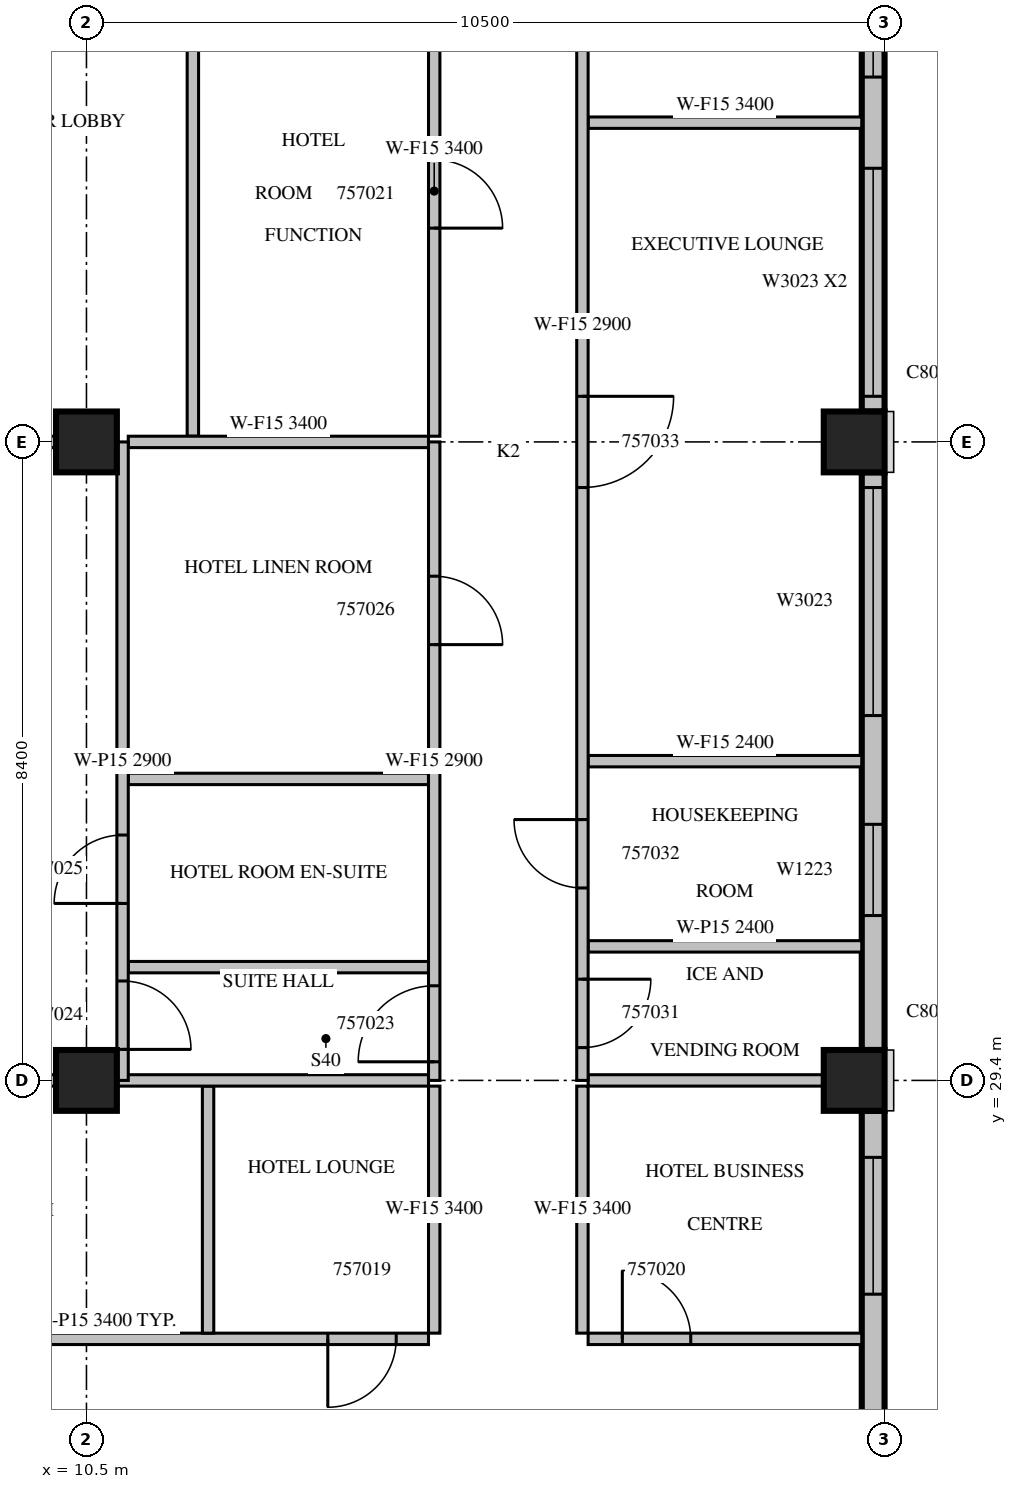
"""IFC4 building model, lengths in metres.
Left out: names, types, materials, properties, quantities, classifications, styles, units other than length and angle.
Written with IfcOpenShell. Run it as: python <this file> out.ifc"""

import sys

from ifc_helpers import new_model, si_unit, direction, frame, frame_2d, origin, origin_2d, place, context, subcontext, project, spatial, rectangle, extrude, source, transform, mapped, element, fill, save


model = new_model("IFC4")
c1 = context("Model", 3, precision=1e-05, world=origin(), true_north=direction((0.0, 1.0)))
c2 = subcontext(c1, "Body", "Model", "MODEL_VIEW")
j1 = project(units=[si_unit("LENGTHUNIT", "METRE"), si_unit("PLANEANGLEUNIT", "RADIAN")], contexts=[c1])
p1 = place(None, origin())
s1 = spatial("IfcSite", under=j1, at=p1, CompositionType="ELEMENT")
p2 = place(p1, origin())
s2 = spatial("IfcBuilding", under=s1, at=p2, CompositionType="ELEMENT")
p3 = place(p2, frame((0.0, 0.0, 250.0)))
s3 = spatial("IfcBuildingStorey", under=s2, at=p3, CompositionType="ELEMENT", Elevation=250.0)
m1 = source(origin(), c2, "Body", "SweptSolid", [
    extrude(rectangle(XDim=0.8, YDim=0.8, at=origin_2d()), origin(), (0.0, 0.0, 1.0), 3.8),
])
for number, where, z_axis, x_axis in (
    (1, (10.5, 29.4, 0.0), (0.0, 0.0, 1.0), (1.0, 0.0, 0.0)),
    (2, (20.6, 29.4, 0.0), (0.0, 0.0, 1.0), (1.0, 0.0, 0.0)),
    (3, (10.5, 37.8, 0.0), (0.0, 0.0, 1.0), (1.0, 0.0, 0.0)),
    (4, (20.6, 37.8, 0.0), (0.0, 0.0, 1.0), (1.0, 0.0, 0.0)),
):
    element("IfcColumn", number, at=place(p3, frame(where, z_axis=z_axis, x_axis=x_axis)), inside=s3, PredefinedType="COLUMN", context=c2, shape_type="MappedRepresentation", body=[
        mapped(m1, transform((0.0, 0.0, 0.0), scale=1.0)),
    ])
m2 = source(origin(), c2, "Body", "SweptSolid", [
    extrude(rectangle(XDim=7.2, YDim=0.3, at=frame_2d((3.6, 0.0))), origin(), (0.0, 0.0, 1.0), 3.4),
])
p4 = place(p3, frame((20.85, 21.8, 0.0), z_axis=(0.0, 0.0, 1.0), x_axis=(0.0, 1.0, 0.0)))
e5 = element("IfcWall", 5, at=p4, inside=s3, PredefinedType="STANDARD", context=c2, shape_type="MappedRepresentation", body=[
    mapped(m2, transform((0.0, 0.0, 0.0), scale=1.0)),
])
m3 = source(origin(), c2, "Body", "SweptSolid", [
    extrude(rectangle(XDim=1.8, YDim=2.3, at=frame_2d((0.9, 1.15))), frame((0.0, 0.16, 0.0), z_axis=(0.0, -1.0, 0.0), x_axis=(1.0, 0.0, 0.0)), (0.0, 0.0, 1.0), 0.32),
])
p5 = place(p4, frame((0.4, 0.0, 0.6)))
e6 = element("IfcOpeningElement", 6, at=p5, cuts=e5, PredefinedType="OPENING", context=c2, shape_type="MappedRepresentation", body=[
    mapped(m3, transform((0.0, 0.0, 0.0), scale=1.0)),
])
p6 = place(p4, frame((4.787, 0.0, 0.6)))
e7 = element("IfcOpeningElement", 7, at=p6, cuts=e5, PredefinedType="OPENING", context=c2, shape_type="MappedRepresentation", body=[
    mapped(m3, transform((0.0, 0.0, 0.0), scale=1.0)),
])
m4 = source(origin(), c2, "Body", "SweptSolid", [
    extrude(rectangle(XDim=7.6, YDim=0.3, at=frame_2d((3.8, 0.0))), origin(), (0.0, 0.0, 1.0), 3.4),
])
p7 = place(p3, frame((20.85, 29.8, 0.0), z_axis=(0.0, 0.0, 1.0), x_axis=(0.0, 1.0, 0.0)))
e8 = element("IfcWall", 8, at=p7, inside=s3, PredefinedType="STANDARD", context=c2, shape_type="MappedRepresentation", body=[
    mapped(m4, transform((0.0, 0.0, 0.0), scale=1.0)),
])
m5 = source(origin(), c2, "Body", "SweptSolid", [
    extrude(rectangle(XDim=1.2, YDim=2.3, at=frame_2d((0.6, 1.15))), frame((0.0, 0.16, 0.0), z_axis=(0.0, -1.0, 0.0), x_axis=(1.0, 0.0, 0.0)), (0.0, 0.0, 1.0), 0.32),
])
p8 = place(p7, frame((1.769, 0.0, 0.6)))
e9 = element("IfcOpeningElement", 9, at=p8, cuts=e8, PredefinedType="OPENING", context=c2, shape_type="MappedRepresentation", body=[
    mapped(m5, transform((0.0, 0.0, 0.0), scale=1.0)),
])
m6 = source(origin(), c2, "Body", "SweptSolid", [
    extrude(rectangle(XDim=3.0, YDim=2.3, at=frame_2d((1.5, 1.15))), frame((0.0, 0.16, 0.0), z_axis=(0.0, -1.0, 0.0), x_axis=(1.0, 0.0, 0.0)), (0.0, 0.0, 1.0), 0.32),
])
p9 = place(p7, frame((4.4, 0.0, 0.6)))
e10 = element("IfcOpeningElement", 10, at=p9, cuts=e8, PredefinedType="OPENING", context=c2, shape_type="MappedRepresentation", body=[
    mapped(m6, transform((0.0, 0.0, 0.0), scale=1.0)),
])
p10 = place(p3, frame((20.85, 38.2, 0.0), z_axis=(0.0, 0.0, 1.0), x_axis=(0.0, 1.0, 0.0)))
e11 = element("IfcWall", 11, at=p10, inside=s3, PredefinedType="STANDARD", context=c2, shape_type="MappedRepresentation", body=[
    mapped(m4, transform((0.0, 0.0, 0.0), scale=1.0)),
])
p11 = place(p10, frame((0.2, 0.0, 0.6)))
e12 = element("IfcOpeningElement", 12, at=p11, cuts=e11, PredefinedType="OPENING", context=c2, shape_type="MappedRepresentation", body=[
    mapped(m6, transform((0.0, 0.0, 0.0), scale=1.0)),
])
p12 = place(p10, frame((4.4, 0.0, 0.6)))
e13 = element("IfcOpeningElement", 13, at=p12, cuts=e11, PredefinedType="OPENING", context=c2, shape_type="MappedRepresentation", body=[
    mapped(m6, transform((0.0, 0.0, 0.0), scale=1.0)),
])
m7 = source(origin(), c2, "Body", "SweptSolid", [
    extrude(rectangle(XDim=8.495, YDim=0.15, at=frame_2d((4.247, 0.0))), origin(), (0.0, 0.0, 1.0), 3.4),
])
p13 = place(p3, frame((6.505, 26.0, 0.0), z_axis=(0.0, 0.0, 1.0), x_axis=(1.0, 0.0, 0.0)))
e14 = element("IfcWall", 14, at=p13, inside=s3, PredefinedType="PARTITIONING", context=c2, shape_type="MappedRepresentation", body=[
    mapped(m7, transform((0.0, 0.0, 0.0), scale=1.0)),
])
m8 = source(origin(), c2, "Body", "SweptSolid", [
    extrude(rectangle(XDim=0.9, YDim=2.1, at=frame_2d((0.45, 1.05))), frame((0.0, 0.085, 0.0), z_axis=(0.0, -1.0, 0.0), x_axis=(1.0, 0.0, 0.0)), (0.0, 0.0, 1.0), 0.17),
])
p14 = place(p13, frame((2.095, 0.0, 0.0)))
e15 = element("IfcOpeningElement", 15, at=p14, cuts=e14, PredefinedType="OPENING", context=c2, shape_type="MappedRepresentation", body=[
    mapped(m8, transform((0.0, 0.0, 0.0), scale=1.0)),
])
p15 = place(p13, frame((7.17, 0.0, 0.0)))
e16 = element("IfcOpeningElement", 16, at=p15, cuts=e14, PredefinedType="OPENING", context=c2, shape_type="MappedRepresentation", body=[
    mapped(m8, transform((0.0, 0.0, 0.0), scale=1.0)),
])
m9 = source(origin(), c2, "Body", "SweptSolid", [
    extrude(rectangle(XDim=3.6, YDim=0.15, at=frame_2d((1.8, 0.0))), origin(), (0.0, 0.0, 1.0), 3.4),
])
p16 = place(p3, frame((17.1, 26.0, 0.0), z_axis=(0.0, 0.0, 1.0), x_axis=(1.0, 0.0, 0.0)))
e17 = element("IfcWall", 17, at=p16, inside=s3, PredefinedType="PARTITIONING", context=c2, shape_type="MappedRepresentation", body=[
    mapped(m9, transform((0.0, 0.0, 0.0), scale=1.0)),
])
p17 = place(p16, frame((0.45, 0.0, 0.0)))
e18 = element("IfcOpeningElement", 18, at=p17, cuts=e17, PredefinedType="OPENING", context=c2, shape_type="MappedRepresentation", body=[
    mapped(m8, transform((0.0, 0.0, 0.0), scale=1.0)),
])
m10 = source(origin(), c2, "Body", "SweptSolid", [
    extrude(rectangle(XDim=3.25, YDim=0.15, at=frame_2d((1.625, 0.0))), origin(), (0.0, 0.0, 1.0), 3.4),
])
for number, where, z_axis, x_axis in (
    (19, (12.1, 26.075, 0.0), (0.0, 0.0, 1.0), (0.0, 1.0, 0.0)),
    (20, (15.075, 26.075, 0.0), (0.0, 0.0, 1.0), (0.0, 1.0, 0.0)),
    (21, (17.025, 29.325, 0.0), (0.0, 0.0, 1.0), (0.0, -1.0, 0.0)),
):
    element("IfcWall", number, at=place(p3, frame(where, z_axis=z_axis, x_axis=x_axis)), inside=s3, PredefinedType="PARTITIONING", context=c2, shape_type="MappedRepresentation", body=[
        mapped(m10, transform((0.0, 0.0, 0.0), scale=1.0)),
    ])
m11 = source(origin(), c2, "Body", "SweptSolid", [
    extrude(rectangle(XDim=3.596, YDim=0.15, at=frame_2d((1.798, 0.0))), origin(), (0.0, 0.0, 1.0), 3.4),
])
p18 = place(p3, frame((10.101, 29.4, 0.0), z_axis=(0.0, 0.0, 1.0), x_axis=(-1.0, 0.0, 0.0)))
e22 = element("IfcWall", 22, at=p18, inside=s3, PredefinedType="PARTITIONING", context=c2, shape_type="MappedRepresentation", body=[
    mapped(m11, transform((0.0, 0.0, 0.0), scale=1.0)),
])
m12 = source(origin(), c2, "Body", "SweptSolid", [
    extrude(rectangle(XDim=4.101, YDim=0.15, at=frame_2d((2.05, 0.0))), origin(), (0.0, 0.0, 1.0), 3.4),
])
p19 = place(p3, frame((15.0, 29.4, 0.0), z_axis=(0.0, 0.0, 1.0), x_axis=(-1.0, 0.0, 0.0)))
e23 = element("IfcWall", 23, at=p19, inside=s3, PredefinedType="PARTITIONING", context=c2, shape_type="MappedRepresentation", body=[
    mapped(m12, transform((0.0, 0.0, 0.0), scale=1.0)),
])
m13 = source(origin(), c2, "Body", "SweptSolid", [
    extrude(rectangle(XDim=3.101, YDim=0.15, at=frame_2d((1.55, 0.0))), origin(), (0.0, 0.0, 1.0), 3.4),
])
p20 = place(p3, frame((20.201, 29.4, 0.0), z_axis=(0.0, 0.0, 1.0), x_axis=(-1.0, 0.0, 0.0)))
e24 = element("IfcWall", 24, at=p20, inside=s3, PredefinedType="PARTITIONING", context=c2, shape_type="MappedRepresentation", body=[
    mapped(m13, transform((0.0, 0.0, 0.0), scale=1.0)),
])
m14 = source(origin(), c2, "Body", "SweptSolid", [
    extrude(rectangle(XDim=6.45, YDim=0.15, at=frame_2d((3.225, 0.0))), origin(), (0.0, 0.0, 1.0), 3.4),
])
p21 = place(p3, frame((11.9, 44.325, 0.0), z_axis=(0.0, 0.0, 1.0), x_axis=(0.0, -1.0, 0.0)))
e25 = element("IfcWall", 25, at=p21, inside=s3, PredefinedType="PARTITIONING", context=c2, shape_type="MappedRepresentation", body=[
    mapped(m14, transform((0.0, 0.0, 0.0), scale=1.0)),
])
p22 = place(p3, frame((15.075, 37.875, 0.0), z_axis=(0.0, 0.0, 1.0), x_axis=(0.0, 1.0, 0.0)))
e26 = element("IfcWall", 26, at=p22, inside=s3, PredefinedType="PARTITIONING", context=c2, shape_type="MappedRepresentation", body=[
    mapped(m14, transform((0.0, 0.0, 0.0), scale=1.0)),
])
p23 = place(p22, frame((2.737, 0.0, 0.0)))
e27 = element("IfcOpeningElement", 27, at=p23, cuts=e26, PredefinedType="OPENING", context=c2, shape_type="MappedRepresentation", body=[
    mapped(m8, transform((0.0, 0.0, 0.0), scale=1.0)),
])
m15 = source(origin(), c2, "Body", "SweptSolid", [
    extrude(rectangle(XDim=3.95, YDim=0.15, at=frame_2d((1.975, 0.0))), origin(), (0.0, 0.0, 1.0), 3.4),
])
for number, where, z_axis, x_axis in (
    (28, (15.0, 30.89, 0.0), (0.0, 0.0, 1.0), (-1.0, 0.0, 0.0)),
    (29, (15.0, 33.367, 0.0), (0.0, 0.0, 1.0), (-1.0, 0.0, 0.0)),
):
    element("IfcWall", number, at=place(p3, frame(where, z_axis=z_axis, x_axis=x_axis)), inside=s3, PredefinedType="PARTITIONING", context=c2, shape_type="MappedRepresentation", body=[
        mapped(m15, transform((0.0, 0.0, 0.0), scale=1.0)),
    ])
p24 = place(p3, frame((10.101, 37.8, 0.0), z_axis=(0.0, 0.0, 1.0), x_axis=(-1.0, 0.0, 0.0)))
e30 = element("IfcWall", 30, at=p24, inside=s3, PredefinedType="PARTITIONING", context=c2, shape_type="MappedRepresentation", body=[
    mapped(m11, transform((0.0, 0.0, 0.0), scale=1.0)),
])
p25 = place(p3, frame((15.0, 37.8, 0.0), z_axis=(0.0, 0.0, 1.0), x_axis=(-1.0, 0.0, 0.0)))
e31 = element("IfcWall", 31, at=p25, inside=s3, PredefinedType="PARTITIONING", context=c2, shape_type="MappedRepresentation", body=[
    mapped(m15, transform((0.0, 0.0, 0.0), scale=1.0)),
])
m16 = source(origin(), c2, "Body", "SweptSolid", [
    extrude(rectangle(XDim=8.4, YDim=0.15, at=frame_2d((4.2, 0.0))), origin(), (0.0, 0.0, 1.0), 2.9),
])
p26 = place(p3, frame((10.975, 29.4, 0.0), z_axis=(0.0, 0.0, 1.0), x_axis=(0.0, 1.0, 0.0)))
e32 = element("IfcWall", 32, at=p26, inside=s3, PredefinedType="PARTITIONING", context=c2, shape_type="MappedRepresentation", body=[
    mapped(m16, transform((0.0, 0.0, 0.0), scale=1.0)),
])
p27 = place(p26, frame((0.408, 0.0, 0.0)))
e33 = element("IfcOpeningElement", 33, at=p27, cuts=e32, PredefinedType="OPENING", context=c2, shape_type="MappedRepresentation", body=[
    mapped(m8, transform((0.0, 0.0, 0.0), scale=1.0)),
])
p28 = place(p26, frame((2.328, 0.0, 0.0)))
e34 = element("IfcOpeningElement", 34, at=p28, cuts=e32, PredefinedType="OPENING", context=c2, shape_type="MappedRepresentation", body=[
    mapped(m8, transform((0.0, 0.0, 0.0), scale=1.0)),
])
m17 = source(origin(), c2, "Body", "SweptSolid", [
    extrude(rectangle(XDim=3.6, YDim=0.15, at=frame_2d((1.8, 0.0))), origin(), (0.0, 0.0, 1.0), 2.4),
])
for number, where, z_axis, x_axis in (
    (35, (17.1, 31.163, 0.0), (0.0, 0.0, 1.0), (1.0, 0.0, 0.0)),
    (36, (20.7, 33.6, 0.0), (0.0, 0.0, 1.0), (-1.0, 0.0, 0.0)),
):
    element("IfcWall", number, at=place(p3, frame(where, z_axis=z_axis, x_axis=x_axis)), inside=s3, PredefinedType="PARTITIONING", context=c2, shape_type="MappedRepresentation", body=[
        mapped(m17, transform((0.0, 0.0, 0.0), scale=1.0)),
    ])
p29 = place(p3, frame((20.7, 42.0, 0.0), z_axis=(0.0, 0.0, 1.0), x_axis=(-1.0, 0.0, 0.0)))
e37 = element("IfcWall", 37, at=p29, inside=s3, PredefinedType="PARTITIONING", context=c2, shape_type="MappedRepresentation", body=[
    mapped(m9, transform((0.0, 0.0, 0.0), scale=1.0)),
])
p30 = place(p3, frame((15.075, 29.4, 0.0), z_axis=(0.0, 0.0, 1.0), x_axis=(0.0, 1.0, 0.0)))
e38 = element("IfcWall", 38, at=p30, inside=s3, PredefinedType="PARTITIONING", context=c2, shape_type="MappedRepresentation", body=[
    mapped(m16, transform((0.0, 0.0, 0.0), scale=1.0)),
])
m18 = source(origin(), c2, "Body", "SweptSolid", [
    extrude(rectangle(XDim=1.0, YDim=2.1, at=frame_2d((0.5, 1.05))), frame((0.0, 0.085, 0.0), z_axis=(0.0, -1.0, 0.0), x_axis=(1.0, 0.0, 0.0)), (0.0, 0.0, 1.0), 0.17),
])
p31 = place(p30, frame((0.245, 0.0, 0.0)))
e39 = element("IfcOpeningElement", 39, at=p31, cuts=e38, PredefinedType="OPENING", context=c2, shape_type="MappedRepresentation", body=[
    mapped(m18, transform((0.0, 0.0, 0.0), scale=1.0)),
])
p32 = place(p30, frame((5.733, 0.0, 0.0)))
e40 = element("IfcOpeningElement", 40, at=p32, cuts=e38, PredefinedType="OPENING", context=c2, shape_type="MappedRepresentation", body=[
    mapped(m8, transform((0.0, 0.0, 0.0), scale=1.0)),
])
m19 = source(origin(), c2, "Body", "SweptSolid", [
    extrude(rectangle(XDim=19.86, YDim=0.15, at=frame_2d((9.93, 0.0))), origin(), (0.0, 0.0, 1.0), 2.9),
])
p33 = place(p3, frame((17.025, 49.26, 0.0), z_axis=(0.0, 0.0, 1.0), x_axis=(0.0, -1.0, 0.0)))
e41 = element("IfcWall", 41, at=p33, inside=s3, PredefinedType="PARTITIONING", context=c2, shape_type="MappedRepresentation", body=[
    mapped(m19, transform((0.0, 0.0, 0.0), scale=1.0)),
])
p34 = place(p33, frame((18.528, 0.0, 0.0)))
e42 = element("IfcOpeningElement", 42, at=p34, cuts=e41, PredefinedType="OPENING", context=c2, shape_type="MappedRepresentation", body=[
    mapped(m8, transform((0.0, 0.0, 0.0), scale=1.0)),
])
p35 = place(p33, frame((16.428, 0.0, 0.0)))
e43 = element("IfcOpeningElement", 43, at=p35, cuts=e41, PredefinedType="OPENING", context=c2, shape_type="MappedRepresentation", body=[
    mapped(m8, transform((0.0, 0.0, 0.0), scale=1.0)),
])
m20 = source(origin(), c2, "Body", "SweptSolid", [
    extrude(rectangle(XDim=1.2, YDim=2.1, at=frame_2d((0.6, 1.05))), frame((0.0, 0.085, 0.0), z_axis=(0.0, -1.0, 0.0), x_axis=(1.0, 0.0, 0.0)), (0.0, 0.0, 1.0), 0.17),
])
p36 = place(p33, frame((10.86, 0.0, 0.0)))
e44 = element("IfcOpeningElement", 44, at=p36, cuts=e41, PredefinedType="OPENING", context=c2, shape_type="MappedRepresentation", body=[
    mapped(m20, transform((0.0, 0.0, 0.0), scale=1.0)),
])
p37 = place(p33, frame((3.143, 0.0, 0.0)))
e45 = element("IfcOpeningElement", 45, at=p37, cuts=e41, PredefinedType="OPENING", context=c2, shape_type="MappedRepresentation", body=[
    mapped(m8, transform((0.0, 0.0, 0.0), scale=1.0)),
])
m21 = source(origin(), c2, "Body", "SweptSolid", [
    extrude(rectangle(XDim=1.8, YDim=2.3, at=frame_2d((0.9, 1.15))), frame((0.0, 0.03, 0.0), z_axis=(0.0, -1.0, 0.0), x_axis=(1.0, 0.0, 0.0)), (0.0, 0.0, 1.0), 0.06),
])
p38 = place(p6, origin())
e46 = element("IfcWindow", 46, at=p38, inside=s3, PartitioningType="SINGLE_PANEL", PredefinedType="WINDOW", context=c2, shape_type="MappedRepresentation", body=[
    mapped(m21, transform((0.0, 0.0, 0.0), scale=1.0)),
])
fill(e7, e46)
m22 = source(origin(), c2, "Body", "SweptSolid", [
    extrude(rectangle(XDim=1.2, YDim=2.3, at=frame_2d((0.6, 1.15))), frame((0.0, 0.03, 0.0), z_axis=(0.0, -1.0, 0.0), x_axis=(1.0, 0.0, 0.0)), (0.0, 0.0, 1.0), 0.06),
])
p39 = place(p8, origin())
e47 = element("IfcWindow", 47, at=p39, inside=s3, PartitioningType="SINGLE_PANEL", PredefinedType="WINDOW", context=c2, shape_type="MappedRepresentation", body=[
    mapped(m22, transform((0.0, 0.0, 0.0), scale=1.0)),
])
fill(e9, e47)
m23 = source(origin(), c2, "Body", "SweptSolid", [
    extrude(rectangle(XDim=3.0, YDim=2.3, at=frame_2d((1.5, 1.15))), frame((0.0, 0.03, 0.0), z_axis=(0.0, -1.0, 0.0), x_axis=(1.0, 0.0, 0.0)), (0.0, 0.0, 1.0), 0.06),
])
p40 = place(p9, origin())
e48 = element("IfcWindow", 48, at=p40, inside=s3, PartitioningType="SINGLE_PANEL", PredefinedType="WINDOW", context=c2, shape_type="MappedRepresentation", body=[
    mapped(m23, transform((0.0, 0.0, 0.0), scale=1.0)),
])
fill(e10, e48)
p41 = place(p11, origin())
e49 = element("IfcWindow", 49, at=p41, inside=s3, PartitioningType="SINGLE_PANEL", PredefinedType="WINDOW", context=c2, shape_type="MappedRepresentation", body=[
    mapped(m23, transform((0.0, 0.0, 0.0), scale=1.0)),
])
fill(e12, e49)
p42 = place(p12, origin())
e50 = element("IfcWindow", 50, at=p42, inside=s3, PartitioningType="SINGLE_PANEL", PredefinedType="WINDOW", context=c2, shape_type="MappedRepresentation", body=[
    mapped(m23, transform((0.0, 0.0, 0.0), scale=1.0)),
])
fill(e13, e50)
m24 = source(origin(), c2, "Body", "SweptSolid", [
    extrude(rectangle(XDim=0.9, YDim=2.1, at=frame_2d((0.45, 1.05))), frame((0.0, 0.025, 0.0), z_axis=(0.0, -1.0, 0.0), x_axis=(1.0, 0.0, 0.0)), (0.0, 0.0, 1.0), 0.05),
])
p43 = place(p15, origin())
e51 = element("IfcDoor", 51, at=p43, inside=s3, OperationType="SINGLE_SWING_RIGHT", PredefinedType="DOOR", context=c2, shape_type="MappedRepresentation", body=[
    mapped(m24, transform((0.0, 0.0, 0.0), scale=1.0)),
])
fill(e16, e51)
p44 = place(p17, origin())
e52 = element("IfcDoor", 52, at=p44, inside=s3, OperationType="SINGLE_SWING_LEFT", PredefinedType="DOOR", context=c2, shape_type="MappedRepresentation", body=[
    mapped(m24, transform((0.0, 0.0, 0.0), scale=1.0)),
])
fill(e18, e52)
p45 = place(p23, origin())
e53 = element("IfcDoor", 53, at=p45, inside=s3, OperationType="SINGLE_SWING_RIGHT", PredefinedType="DOOR", context=c2, shape_type="MappedRepresentation", body=[
    mapped(m24, transform((0.0, 0.0, 0.0), scale=1.0)),
])
fill(e27, e53)
m25 = source(origin(), c2, "Body", "SweptSolid", [
    extrude(rectangle(XDim=1.0, YDim=2.1, at=frame_2d((0.5, 1.05))), frame((0.0, 0.025, 0.0), z_axis=(0.0, -1.0, 0.0), x_axis=(1.0, 0.0, 0.0)), (0.0, 0.0, 1.0), 0.05),
])
p46 = place(p31, origin())
e54 = element("IfcDoor", 54, at=p46, inside=s3, OperationType="SINGLE_SWING_LEFT", PredefinedType="DOOR", context=c2, shape_type="MappedRepresentation", body=[
    mapped(m25, transform((0.0, 0.0, 0.0), scale=1.0)),
])
fill(e39, e54)
p47 = place(p27, origin())
e55 = element("IfcDoor", 55, at=p47, inside=s3, OperationType="SINGLE_SWING_RIGHT", PredefinedType="DOOR", context=c2, shape_type="MappedRepresentation", body=[
    mapped(m24, transform((0.0, 0.0, 0.0), scale=1.0)),
])
fill(e33, e55)
p48 = place(p28, origin())
e56 = element("IfcDoor", 56, at=p48, inside=s3, OperationType="SINGLE_SWING_LEFT", PredefinedType="DOOR", context=c2, shape_type="MappedRepresentation", body=[
    mapped(m24, transform((0.0, 0.0, 0.0), scale=1.0)),
])
fill(e34, e56)
p49 = place(p32, origin())
e57 = element("IfcDoor", 57, at=p49, inside=s3, OperationType="SINGLE_SWING_RIGHT", PredefinedType="DOOR", context=c2, shape_type="MappedRepresentation", body=[
    mapped(m24, transform((0.0, 0.0, 0.0), scale=1.0)),
])
fill(e40, e57)
p50 = place(p34, origin())
e58 = element("IfcDoor", 58, at=p50, inside=s3, OperationType="SINGLE_SWING_LEFT", PredefinedType="DOOR", context=c2, shape_type="MappedRepresentation", body=[
    mapped(m24, transform((0.0, 0.0, 0.0), scale=1.0)),
])
fill(e42, e58)
p51 = place(p35, origin())
e59 = element("IfcDoor", 59, at=p51, inside=s3, OperationType="SINGLE_SWING_RIGHT", PredefinedType="DOOR", context=c2, shape_type="MappedRepresentation", body=[
    mapped(m24, transform((0.0, 0.0, 0.0), scale=1.0)),
])
fill(e43, e59)
m26 = source(origin(), c2, "Body", "SweptSolid", [
    extrude(rectangle(XDim=1.2, YDim=2.1, at=frame_2d((0.6, 1.05))), frame((0.0, 0.025, 0.0), z_axis=(0.0, -1.0, 0.0), x_axis=(1.0, 0.0, 0.0)), (0.0, 0.0, 1.0), 0.05),
])
p52 = place(p36, origin())
e60 = element("IfcDoor", 60, at=p52, inside=s3, OperationType="SINGLE_SWING_LEFT", PredefinedType="DOOR", context=c2, shape_type="MappedRepresentation", body=[
    mapped(m26, transform((0.0, 0.0, 0.0), scale=1.0)),
])
fill(e44, e60)
save(model, sys.argv[1])
